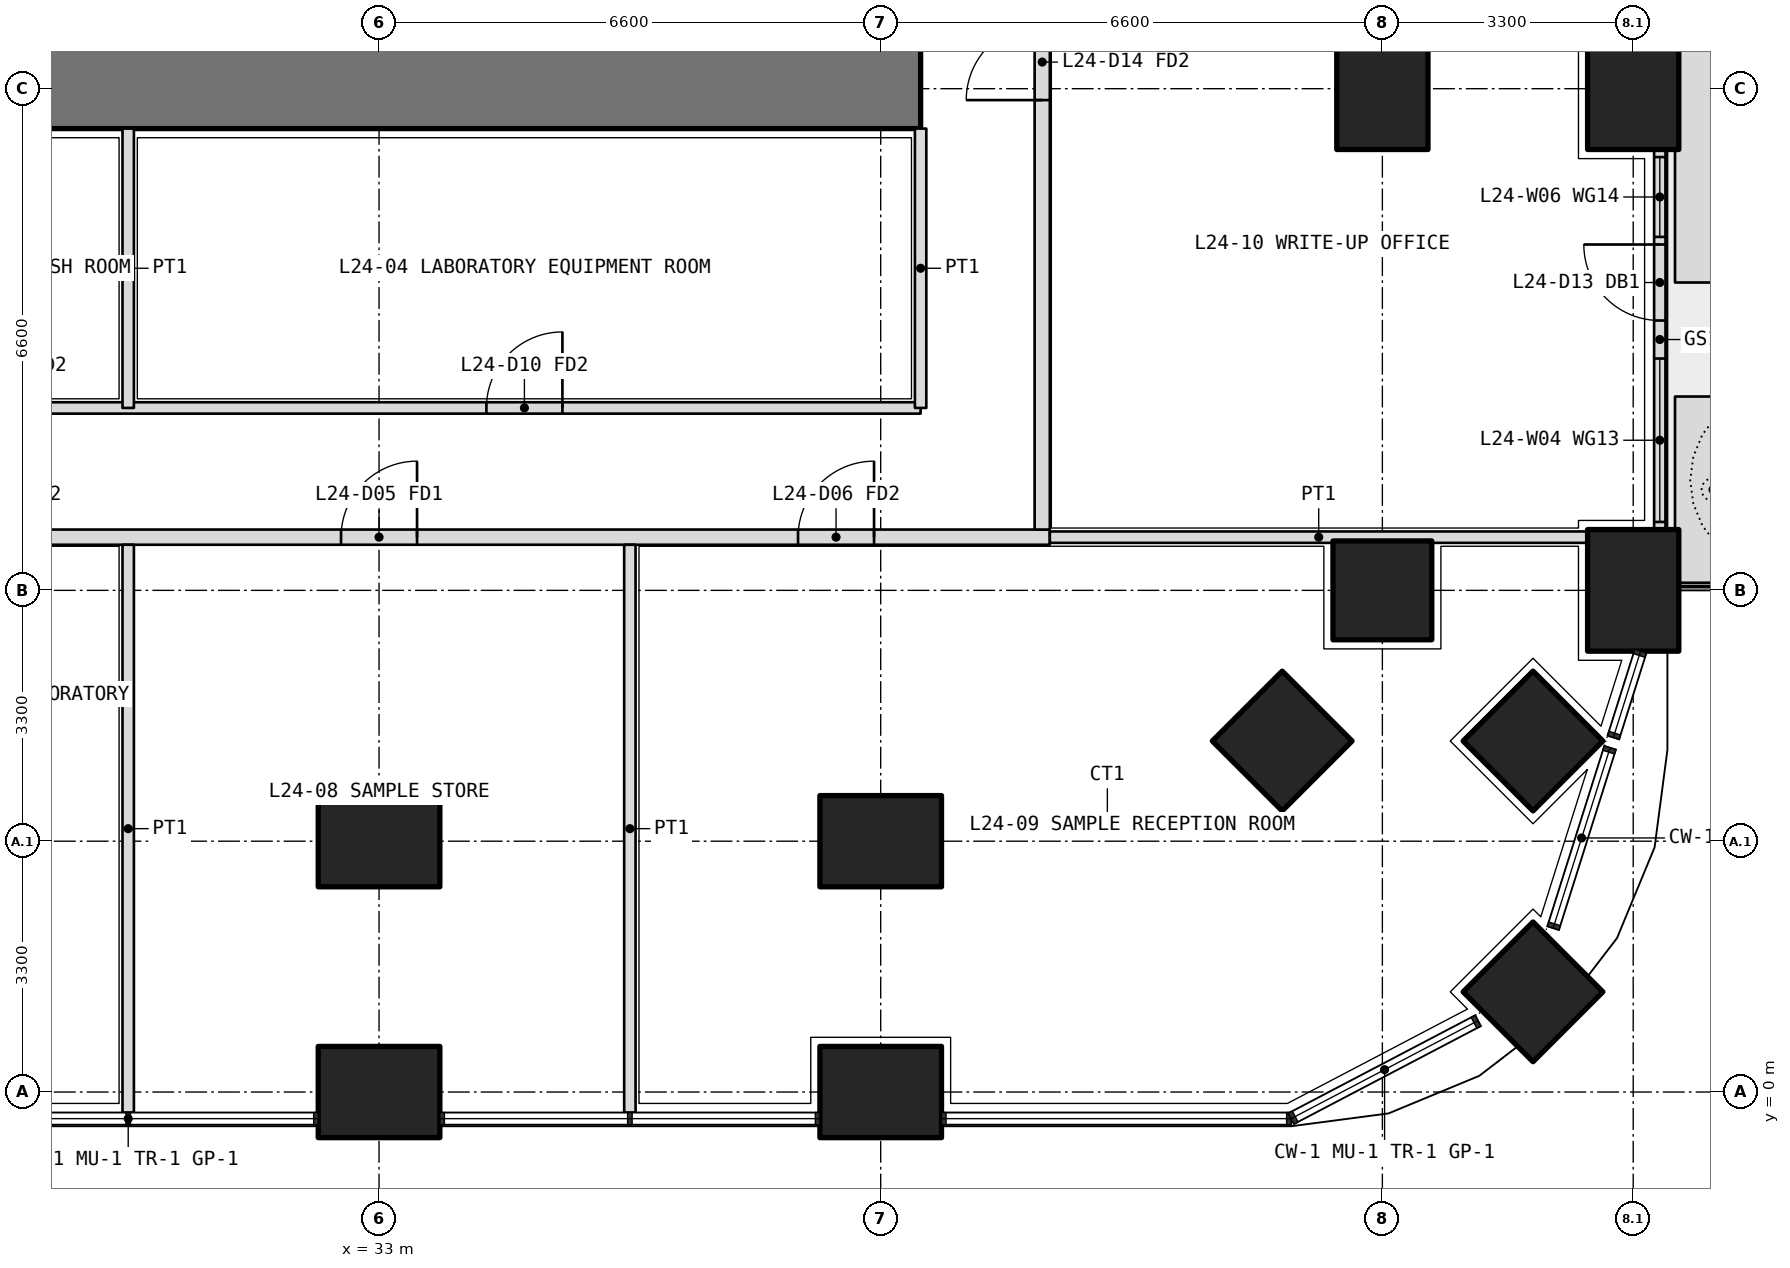
"""IFC4 building model, lengths in metres.
Left out: names, types, materials, properties, quantities, classifications, styles, units other than length and angle.
Written with IfcOpenShell. Run it as: python <this file> out.ifc"""

import sys

from ifc_helpers import new_model, si_unit, direction, frame, frame_2d, origin, origin_2d, place, context, subcontext, project, spatial, polyline, rectangle, outline, extrude, element, fill, save


model = new_model("IFC4")
c1 = context("Model", 3, precision=1e-05, world=origin(), true_north=direction((0.0, 1.0)))
c2 = subcontext(c1, "Body", "Model", "MODEL_VIEW")
j1 = project(units=[si_unit("LENGTHUNIT", "METRE"), si_unit("PLANEANGLEUNIT", "RADIAN")], contexts=[c1])
p1 = place(None, origin())
s1 = spatial("IfcSite", under=j1, at=p1, CompositionType="ELEMENT")
p2 = place(p1, origin())
s2 = spatial("IfcBuilding", under=s1, at=p2, CompositionType="ELEMENT")
p3 = place(p2, frame((0.0, 0.0, 107.4)))
s3 = spatial("IfcBuildingStorey", under=s2, at=p3, CompositionType="ELEMENT", Elevation=107.4)
p4 = place(p3, frame((48.182, 1.318, 0.0), z_axis=(0.0, 0.0, 1.0), x_axis=(0.707106781187, 0.707106781187, 0.0)))
e1 = element("IfcColumn", 1, at=p4, inside=s3, PredefinedType="COLUMN", context=c2, shape_type="SweptSolid", body=[
    extrude(rectangle(XDim=1.3, YDim=1.3, at=origin_2d()), origin(), (0.0, 0.0, 1.0), 4.2),
])
for number, where, z_axis, x_axis in (
    (2, (33.0, 0.0, 0.0), (0.0, 0.0, 1.0), (1.0, 0.0, 0.0)),
    (3, (39.6, 0.0, 0.0), (0.0, 0.0, 1.0), (1.0, 0.0, 0.0)),
    (4, (49.5, 6.6, 0.0), (0.0, 0.0, 1.0), (0.0, 1.0, 0.0)),
    (5, (49.5, 13.2, 0.0), (0.0, 0.0, 1.0), (0.0, 1.0, 0.0)),
):
    element("IfcColumn", number, at=place(p3, frame(where, z_axis=z_axis, x_axis=x_axis)), inside=s3, PredefinedType="COLUMN", context=c2, shape_type="SweptSolid", body=[
        extrude(rectangle(XDim=1.6, YDim=1.2, at=origin_2d()), origin(), (0.0, 0.0, 1.0), 4.2),
    ])
for number, where, z_axis, x_axis in (
    (6, (46.2, 6.6, 0.0), (0.0, 0.0, 1.0), (1.0, 0.0, 0.0)),
    (7, (48.182, 4.618, 0.0), (0.0, 0.0, 1.0), (0.707, 0.707, 0.0)),
):
    element("IfcColumn", number, at=place(p3, frame(where, z_axis=z_axis, x_axis=x_axis)), inside=s3, PredefinedType="COLUMN", context=c2, shape_type="SweptSolid", body=[
        extrude(rectangle(XDim=1.3, YDim=1.3, at=origin_2d()), origin(), (0.0, 0.0, 1.0), 4.2),
    ])
for number, where, z_axis, x_axis in (
    (8, (33.0, 3.3, 0.0), (0.0, 0.0, 1.0), (1.0, 0.0, 0.0)),
    (9, (39.6, 3.3, 0.0), (0.0, 0.0, 1.0), (1.0, 0.0, 0.0)),
):
    element("IfcColumn", number, at=place(p3, frame(where, z_axis=z_axis, x_axis=x_axis)), inside=s3, PredefinedType="COLUMN", context=c2, shape_type="SweptSolid", body=[
        extrude(rectangle(XDim=1.6, YDim=1.2, at=origin_2d()), origin(), (0.0, 0.0, 1.0), 4.2),
    ])
p5 = place(p3, frame((44.882, 4.618, 0.0), z_axis=(0.0, 0.0, 1.0), x_axis=(0.707106781187, 0.707106781187, 0.0)))
e10 = element("IfcColumn", 10, at=p5, inside=s3, PredefinedType="COLUMN", context=c2, shape_type="SweptSolid", body=[
    extrude(rectangle(XDim=1.3, YDim=1.3, at=origin_2d()), origin(), (0.0, 0.0, 1.0), 4.2),
])
p6 = place(p3, frame((46.2, 13.2, 0.0), z_axis=(0.0, 0.0, 1.0), x_axis=(0.0, 1.0, 0.0)))
e11 = element("IfcColumn", 11, at=p6, inside=s3, PredefinedType="COLUMN", context=c2, shape_type="SweptSolid", body=[
    extrude(rectangle(XDim=1.6, YDim=1.2, at=origin_2d()), origin(), (0.0, 0.0, 1.0), 4.2),
])
p7 = place(p3, origin())
e12 = element("IfcWall", 12, at=p7, inside=s3, PredefinedType="USERDEFINED", context=c2, shape_type="SweptSolid", body=[
    extrude(outline(polyline([(50.05, 6.7), (51.05, 6.7), (51.05, 9.15), (50.05, 9.15), (50.05, 6.7)]), holes=[polyline([(50.2, 6.85), (50.9, 6.85), (50.9, 9.0), (50.2, 9.0), (50.2, 6.85)])]), origin(), (0.0, 0.0, 1.0), 1.05),
])
p8 = place(p3, origin())
e13 = element("IfcWall", 13, at=p8, inside=s3, PredefinedType="USERDEFINED", context=c2, shape_type="SweptSolid", body=[
    extrude(outline(polyline([(50.05, 10.65), (51.05, 10.65), (51.05, 19.7), (50.05, 19.7), (50.05, 10.65)]), holes=[polyline([(50.2, 10.8), (50.9, 10.8), (50.9, 19.55), (50.2, 19.55), (50.2, 10.8)])]), origin(), (0.0, 0.0, 1.0), 1.05),
])
p9 = place(p3, frame((49.85, 7.4, 0.0), z_axis=(0.0, 0.0, 1.0), x_axis=(0.0, 1.0, 0.0)))
e14 = element("IfcWall", 14, at=p9, inside=s3, PredefinedType="SOLIDWALL", context=c2, shape_type="SweptSolid", body=[
    extrude(rectangle(XDim=5.0, YDim=0.15, at=frame_2d((2.5, 0.0))), origin(), (0.0, 0.0, 1.0), 2.7),
])
p10 = place(p9, frame((2.75, 0.0, 0.0)))
e15 = element("IfcOpeningElement", 15, at=p10, cuts=e14, PredefinedType="OPENING", context=c2, shape_type="SweptSolid", body=[
    extrude(rectangle(XDim=1.0, YDim=2.4, at=frame_2d((0.5, 1.2))), frame((0.0, 0.085, 0.0), z_axis=(0.0, -1.0, 0.0), x_axis=(1.0, 0.0, 0.0)), (0.0, 0.0, 1.0), 0.17),
])
p11 = place(p9, frame((0.1, 0.0, 0.1)))
e16 = element("IfcOpeningElement", 16, at=p11, cuts=e14, PredefinedType="OPENING", context=c2, shape_type="SweptSolid", body=[
    extrude(rectangle(XDim=2.15, YDim=2.3, at=frame_2d((1.075, 1.15))), frame((0.0, 0.085, 0.0), z_axis=(0.0, -1.0, 0.0), x_axis=(1.0, 0.0, 0.0)), (0.0, 0.0, 1.0), 0.17),
])
p12 = place(p9, frame((3.85, 0.0, 0.1)))
e17 = element("IfcOpeningElement", 17, at=p12, cuts=e14, PredefinedType="OPENING", context=c2, shape_type="SweptSolid", body=[
    extrude(rectangle(XDim=1.05, YDim=2.3, at=frame_2d((0.525, 1.15))), frame((0.0, 0.085, 0.0), z_axis=(0.0, -1.0, 0.0), x_axis=(1.0, 0.0, 0.0)), (0.0, 0.0, 1.0), 0.17),
])
p13 = place(p3, frame((12.675, 13.2, 0.0), z_axis=(0.0, 0.0, 1.0), x_axis=(1.0, 0.0, 0.0)))
e18 = element("IfcWall", 18, at=p13, inside=s3, PredefinedType="SHEAR", context=c2, shape_type="SweptSolid", body=[
    extrude(rectangle(XDim=27.45, YDim=1.05, at=frame_2d((13.725, 0.0))), origin(), (0.0, 0.0, 1.0), 4.2),
])
p14 = place(p3, frame((12.675, 9.0, 0.0), z_axis=(0.0, 0.0, 1.0), x_axis=(1.0, 0.0, 0.0)))
e19 = element("IfcWall", 19, at=p14, inside=s3, PredefinedType="PARTITIONING", context=c2, shape_type="SweptSolid", body=[
    extrude(rectangle(XDim=27.45, YDim=0.15, at=frame_2d((13.725, 0.0))), origin(), (0.0, 0.0, 1.0), 2.85),
])
p15 = place(p14, frame((1.413, 0.0, 0.0)))
e20 = element("IfcOpeningElement", 20, at=p15, cuts=e19, PredefinedType="OPENING", context=c2, shape_type="SweptSolid", body=[
    extrude(rectangle(XDim=1.0, YDim=2.1, at=frame_2d((0.5, 1.05))), frame((0.0, 0.085, 0.0), z_axis=(0.0, -1.0, 0.0), x_axis=(1.0, 0.0, 0.0)), (0.0, 0.0, 1.0), 0.17),
])
p16 = place(p14, frame((8.275, 0.0, 0.0)))
e21 = element("IfcOpeningElement", 21, at=p16, cuts=e19, PredefinedType="OPENING", context=c2, shape_type="SweptSolid", body=[
    extrude(rectangle(XDim=1.0, YDim=2.1, at=frame_2d((0.5, 1.05))), frame((0.0, 0.085, 0.0), z_axis=(0.0, -1.0, 0.0), x_axis=(1.0, 0.0, 0.0)), (0.0, 0.0, 1.0), 0.17),
])
p17 = place(p14, frame((14.875, 0.0, 0.0)))
e22 = element("IfcOpeningElement", 22, at=p17, cuts=e19, PredefinedType="OPENING", context=c2, shape_type="SweptSolid", body=[
    extrude(rectangle(XDim=1.0, YDim=2.1, at=frame_2d((0.5, 1.05))), frame((0.0, 0.085, 0.0), z_axis=(0.0, -1.0, 0.0), x_axis=(1.0, 0.0, 0.0)), (0.0, 0.0, 1.0), 0.17),
])
p18 = place(p14, frame((21.738, 0.0, 0.0)))
e23 = element("IfcOpeningElement", 23, at=p18, cuts=e19, PredefinedType="OPENING", context=c2, shape_type="SweptSolid", body=[
    extrude(rectangle(XDim=1.0, YDim=2.1, at=frame_2d((0.5, 1.05))), frame((0.0, 0.085, 0.0), z_axis=(0.0, -1.0, 0.0), x_axis=(1.0, 0.0, 0.0)), (0.0, 0.0, 1.0), 0.17),
])
p19 = place(p3, frame((40.125, 12.675, 0.0), z_axis=(0.0, 0.0, 1.0), x_axis=(0.0, -1.0, 0.0)))
e24 = element("IfcWall", 24, at=p19, inside=s3, PredefinedType="PARTITIONING", context=c2, shape_type="SweptSolid", body=[
    extrude(rectangle(XDim=3.675, YDim=0.15, at=frame_2d((1.837, 0.0))), origin(), (0.0, 0.0, 1.0), 2.85),
])
p20 = place(p3, frame((29.7, 12.675, 0.0), z_axis=(0.0, 0.0, 1.0), x_axis=(0.0, -1.0, 0.0)))
e25 = element("IfcWall", 25, at=p20, inside=s3, PredefinedType="PARTITIONING", context=c2, shape_type="SweptSolid", body=[
    extrude(rectangle(XDim=3.675, YDim=0.15, at=frame_2d((1.837, 0.0))), origin(), (0.0, 0.0, 1.0), 3.9),
])
p21 = place(p3, frame((10.975, 7.3, 0.0), z_axis=(0.0, 0.0, 1.0), x_axis=(1.0, 0.0, 0.0)))
e26 = element("IfcWall", 26, at=p21, inside=s3, PredefinedType="PARTITIONING", context=c2, shape_type="SweptSolid", body=[
    extrude(rectangle(XDim=30.85, YDim=0.2, at=frame_2d((15.425, 0.0))), origin(), (0.0, 0.0, 1.0), 2.85),
])
p22 = place(p21, frame((0.562, 0.0, 0.0)))
e27 = element("IfcOpeningElement", 27, at=p22, cuts=e26, PredefinedType="OPENING", context=c2, shape_type="SweptSolid", body=[
    extrude(rectangle(XDim=1.2, YDim=2.1, at=frame_2d((0.6, 1.05))), frame((0.0, 0.11, 0.0), z_axis=(0.0, -1.0, 0.0), x_axis=(1.0, 0.0, 0.0)), (0.0, 0.0, 1.0), 0.22),
])
p23 = place(p21, frame((8.325, 0.0, 0.0)))
e28 = element("IfcOpeningElement", 28, at=p23, cuts=e26, PredefinedType="OPENING", context=c2, shape_type="SweptSolid", body=[
    extrude(rectangle(XDim=1.0, YDim=2.1, at=frame_2d((0.5, 1.05))), frame((0.0, 0.11, 0.0), z_axis=(0.0, -1.0, 0.0), x_axis=(1.0, 0.0, 0.0)), (0.0, 0.0, 1.0), 0.22),
])
p24 = place(p21, frame((16.475, 0.0, 0.0)))
e29 = element("IfcOpeningElement", 29, at=p24, cuts=e26, PredefinedType="OPENING", context=c2, shape_type="SweptSolid", body=[
    extrude(rectangle(XDim=1.2, YDim=2.1, at=frame_2d((0.6, 1.05))), frame((0.0, 0.11, 0.0), z_axis=(0.0, -1.0, 0.0), x_axis=(1.0, 0.0, 0.0)), (0.0, 0.0, 1.0), 0.22),
])
p25 = place(p21, frame((21.525, 0.0, 0.0)))
e30 = element("IfcOpeningElement", 30, at=p25, cuts=e26, PredefinedType="OPENING", context=c2, shape_type="SweptSolid", body=[
    extrude(rectangle(XDim=1.0, YDim=2.1, at=frame_2d((0.5, 1.05))), frame((0.0, 0.11, 0.0), z_axis=(0.0, -1.0, 0.0), x_axis=(1.0, 0.0, 0.0)), (0.0, 0.0, 1.0), 0.22),
])
p26 = place(p21, frame((27.538, 0.0, 0.0)))
e31 = element("IfcOpeningElement", 31, at=p26, cuts=e26, PredefinedType="OPENING", context=c2, shape_type="SweptSolid", body=[
    extrude(rectangle(XDim=1.0, YDim=2.1, at=frame_2d((0.5, 1.05))), frame((0.0, 0.11, 0.0), z_axis=(0.0, -1.0, 0.0), x_axis=(1.0, 0.0, 0.0)), (0.0, 0.0, 1.0), 0.22),
])
p27 = place(p3, frame((41.725, 7.4, 0.0), z_axis=(0.0, 0.0, 1.0), x_axis=(0.0, 1.0, 0.0)))
e32 = element("IfcWall", 32, at=p27, inside=s3, PredefinedType="PARTITIONING", context=c2, shape_type="SweptSolid", body=[
    extrude(rectangle(XDim=27.625, YDim=0.2, at=frame_2d((13.812, 0.0))), origin(), (0.0, 0.0, 1.0), 2.85),
])
p28 = place(p27, frame((5.65, 0.0, 0.0)))
e33 = element("IfcOpeningElement", 33, at=p28, cuts=e32, PredefinedType="OPENING", context=c2, shape_type="SweptSolid", body=[
    extrude(rectangle(XDim=1.0, YDim=2.1, at=frame_2d((0.5, 1.05))), frame((0.0, 0.11, 0.0), z_axis=(0.0, -1.0, 0.0), x_axis=(1.0, 0.0, 0.0)), (0.0, 0.0, 1.0), 0.22),
])
p29 = place(p27, frame((13.4, 0.0, 0.0)))
e34 = element("IfcOpeningElement", 34, at=p29, cuts=e32, PredefinedType="OPENING", context=c2, shape_type="SweptSolid", body=[
    extrude(rectangle(XDim=1.0, YDim=2.1, at=frame_2d((0.5, 1.05))), frame((0.0, 0.11, 0.0), z_axis=(0.0, -1.0, 0.0), x_axis=(1.0, 0.0, 0.0)), (0.0, 0.0, 1.0), 0.22),
])
p30 = place(p27, frame((16.75, 0.0, 0.0)))
e35 = element("IfcOpeningElement", 35, at=p30, cuts=e32, PredefinedType="OPENING", context=c2, shape_type="SweptSolid", body=[
    extrude(rectangle(XDim=0.9, YDim=2.1, at=frame_2d((0.45, 1.05))), frame((0.0, 0.11, 0.0), z_axis=(0.0, -1.0, 0.0), x_axis=(1.0, 0.0, 0.0)), (0.0, 0.0, 1.0), 0.22),
])
p31 = place(p27, frame((20.15, 0.0, 0.0)))
e36 = element("IfcOpeningElement", 36, at=p31, cuts=e32, PredefinedType="OPENING", context=c2, shape_type="SweptSolid", body=[
    extrude(rectangle(XDim=1.0, YDim=2.1, at=frame_2d((0.5, 1.05))), frame((0.0, 0.11, 0.0), z_axis=(0.0, -1.0, 0.0), x_axis=(1.0, 0.0, 0.0)), (0.0, 0.0, 1.0), 0.22),
])
p32 = place(p27, frame((24.512, 0.0, 0.0)))
e37 = element("IfcOpeningElement", 37, at=p32, cuts=e32, PredefinedType="OPENING", context=c2, shape_type="SweptSolid", body=[
    extrude(rectangle(XDim=1.0, YDim=2.1, at=frame_2d((0.5, 1.05))), frame((0.0, 0.11, 0.0), z_axis=(0.0, -1.0, 0.0), x_axis=(1.0, 0.0, 0.0)), (0.0, 0.0, 1.0), 0.22),
])
p33 = place(p3, frame((48.9, 7.3, 0.0), z_axis=(0.0, 0.0, 1.0), x_axis=(-1.0, 0.0, 0.0)))
e38 = element("IfcWall", 38, at=p33, inside=s3, PredefinedType="PARTITIONING", context=c2, shape_type="SweptSolid", body=[
    extrude(rectangle(XDim=7.075, YDim=0.15, at=frame_2d((3.538, 0.0))), origin(), (0.0, 0.0, 1.0), 2.85),
])
for number, where, z_axis, x_axis in (
    (39, (29.7, -0.27, 0.0), (0.0, 0.0, 1.0), (0.0, 1.0, 0.0)),
    (40, (36.3, -0.27, 0.0), (0.0, 0.0, 1.0), (0.0, 1.0, 0.0)),
):
    element("IfcWall", number, at=place(p3, frame(where, z_axis=z_axis, x_axis=x_axis)), inside=s3, PredefinedType="PARTITIONING", context=c2, shape_type="SweptSolid", body=[
        extrude(rectangle(XDim=7.47, YDim=0.15, at=frame_2d((3.735, 0.0))), origin(), (0.0, 0.0, 1.0), 2.7),
    ])
p34 = place(p10, origin())
e41 = element("IfcDoor", 41, at=p34, inside=s3, OperationType="SINGLE_SWING_RIGHT", PredefinedType="DOOR", context=c2, shape_type="SweptSolid", body=[
    extrude(rectangle(XDim=1.0, YDim=2.4, at=frame_2d((0.5, 1.2))), frame((0.0, 0.025, 0.0), z_axis=(0.0, -1.0, 0.0), x_axis=(1.0, 0.0, 0.0)), (0.0, 0.0, 1.0), 0.05),
])
fill(e15, e41)
p35 = place(p11, origin())
e42 = element("IfcWindow", 42, at=p35, inside=s3, PartitioningType="SINGLE_PANEL", PredefinedType="WINDOW", context=c2, shape_type="SweptSolid", body=[
    extrude(rectangle(XDim=2.15, YDim=2.3, at=frame_2d((1.075, 1.15))), frame((0.0, 0.03, 0.0), z_axis=(0.0, -1.0, 0.0), x_axis=(1.0, 0.0, 0.0)), (0.0, 0.0, 1.0), 0.06),
])
fill(e16, e42)
p36 = place(p12, origin())
e43 = element("IfcWindow", 43, at=p36, inside=s3, PartitioningType="SINGLE_PANEL", PredefinedType="WINDOW", context=c2, shape_type="SweptSolid", body=[
    extrude(rectangle(XDim=1.05, YDim=2.3, at=frame_2d((0.525, 1.15))), frame((0.0, 0.03, 0.0), z_axis=(0.0, -1.0, 0.0), x_axis=(1.0, 0.0, 0.0)), (0.0, 0.0, 1.0), 0.06),
])
fill(e17, e43)
p37 = place(p18, origin())
e44 = element("IfcDoor", 44, at=p37, inside=s3, OperationType="SINGLE_SWING_RIGHT", PredefinedType="DOOR", context=c2, shape_type="SweptSolid", body=[
    extrude(rectangle(XDim=1.0, YDim=2.1, at=frame_2d((0.5, 1.05))), frame((0.0, 0.025, 0.0), z_axis=(0.0, -1.0, 0.0), x_axis=(1.0, 0.0, 0.0)), (0.0, 0.0, 1.0), 0.05),
])
fill(e23, e44)
p38 = place(p25, origin())
e45 = element("IfcDoor", 45, at=p38, inside=s3, OperationType="SINGLE_SWING_RIGHT", PredefinedType="DOOR", context=c2, shape_type="SweptSolid", body=[
    extrude(rectangle(XDim=1.0, YDim=2.1, at=frame_2d((0.5, 1.05))), frame((0.0, 0.025, 0.0), z_axis=(0.0, -1.0, 0.0), x_axis=(1.0, 0.0, 0.0)), (0.0, 0.0, 1.0), 0.05),
])
fill(e30, e45)
p39 = place(p26, origin())
e46 = element("IfcDoor", 46, at=p39, inside=s3, OperationType="SINGLE_SWING_RIGHT", PredefinedType="DOOR", context=c2, shape_type="SweptSolid", body=[
    extrude(rectangle(XDim=1.0, YDim=2.1, at=frame_2d((0.5, 1.05))), frame((0.0, 0.025, 0.0), z_axis=(0.0, -1.0, 0.0), x_axis=(1.0, 0.0, 0.0)), (0.0, 0.0, 1.0), 0.05),
])
fill(e31, e46)
p40 = place(p28, origin())
e47 = element("IfcDoor", 47, at=p40, inside=s3, OperationType="SINGLE_SWING_LEFT", PredefinedType="DOOR", context=c2, shape_type="SweptSolid", body=[
    extrude(rectangle(XDim=1.0, YDim=2.1, at=frame_2d((0.5, 1.05))), frame((0.0, 0.025, 0.0), z_axis=(0.0, -1.0, 0.0), x_axis=(1.0, 0.0, 0.0)), (0.0, 0.0, 1.0), 0.05),
])
fill(e33, e47)
save(model, sys.argv[1])
